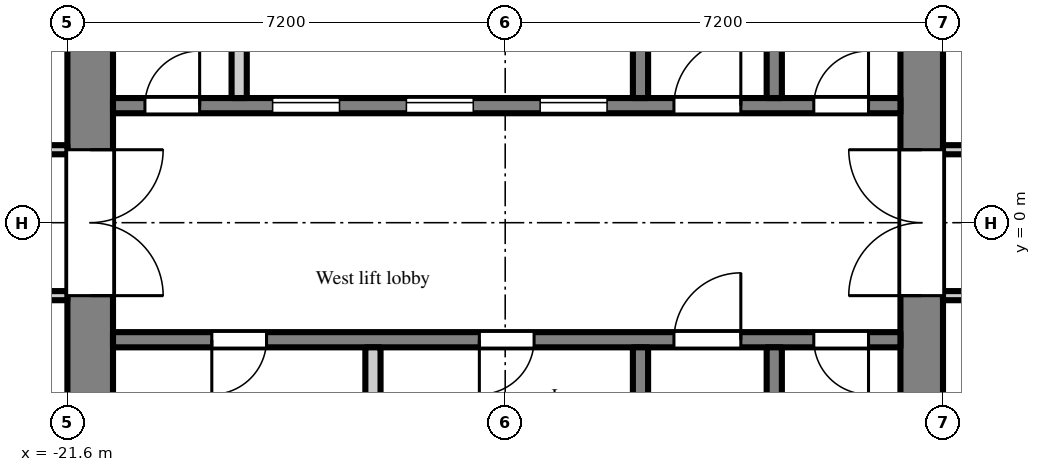
"""IFC4 building model, lengths in metres.
Left out: names, types, materials, properties, quantities, classifications, styles, units other than length and angle.
Written with IfcOpenShell. Run it as: python <this file> out.ifc"""

import sys

from ifc_helpers import new_model, si_unit, direction, frame, frame_2d, origin, place, context, subcontext, project, spatial, rectangle, extrude, element, fill, save


model = new_model("IFC4")
c1 = context("Model", 3, precision=1e-05, world=origin(), true_north=direction((0.0, 1.0)))
c2 = subcontext(c1, "Body", "Model", "MODEL_VIEW")
j1 = project(units=[si_unit("LENGTHUNIT", "METRE"), si_unit("PLANEANGLEUNIT", "RADIAN")], contexts=[c1])
p1 = place(None, origin())
s1 = spatial("IfcSite", under=j1, at=p1, CompositionType="ELEMENT")
p2 = place(p1, origin())
s2 = spatial("IfcBuilding", under=s1, at=p2, CompositionType="ELEMENT")
p3 = place(p2, frame((0.0, 0.0, 170.7)))
s3 = spatial("IfcBuildingStorey", under=s2, at=p3, CompositionType="ELEMENT", Elevation=170.7)
p4 = place(p3, frame((-7.55, -7.2, 0.0), z_axis=(0.0, 0.0, 1.0), x_axis=(0.0, 1.0, 0.0)))
e1 = element("IfcWall", 1, at=p4, inside=s3, PredefinedType="SHEAR", context=c2, shape_type="SweptSolid", body=[
    extrude(rectangle(XDim=14.4, YDim=0.7, at=frame_2d((7.2, 0.0))), origin(), (0.0, 0.0, 1.0), 2.6),
])
p5 = place(p4, frame((6.0, 0.0, 0.0)))
e2 = element("IfcOpeningElement", 2, at=p5, cuts=e1, PredefinedType="OPENING", context=c2, shape_type="SweptSolid", body=[
    extrude(rectangle(XDim=2.4, YDim=2.2, at=frame_2d((1.2, 1.1))), frame((0.0, 0.36, 0.0), z_axis=(0.0, -1.0, 0.0), x_axis=(1.0, 0.0, 0.0)), (0.0, 0.0, 1.0), 0.72),
])
p6 = place(p3, frame((-21.225, -7.2, 0.0), z_axis=(0.0, 0.0, 1.0), x_axis=(0.0, 1.0, 0.0)))
e3 = element("IfcWall", 3, at=p6, inside=s3, PredefinedType="SHEAR", context=c2, shape_type="SweptSolid", body=[
    extrude(rectangle(XDim=14.4, YDim=0.75, at=frame_2d((7.2, 0.0))), origin(), (0.0, 0.0, 1.0), 2.6),
])
p7 = place(p6, frame((6.0, 0.0, 0.0)))
e4 = element("IfcOpeningElement", 4, at=p7, cuts=e3, PredefinedType="OPENING", context=c2, shape_type="SweptSolid", body=[
    extrude(rectangle(XDim=2.4, YDim=2.2, at=frame_2d((1.2, 1.1))), frame((0.0, 0.385, 0.0), z_axis=(0.0, -1.0, 0.0), x_axis=(1.0, 0.0, 0.0)), (0.0, 0.0, 1.0), 0.77),
])
p8 = place(p3, frame((-7.9, 1.925, 0.0), z_axis=(0.0, 0.0, 1.0), x_axis=(-1.0, 0.0, 0.0)))
e5 = element("IfcWall", 5, at=p8, inside=s3, PredefinedType="SHEAR", context=c2, shape_type="SweptSolid", body=[
    extrude(rectangle(XDim=12.95, YDim=0.25, at=frame_2d((6.475, 0.0))), origin(), (0.0, 0.0, 1.0), 2.6),
])
p9 = place(p8, frame((4.825, 0.0, 0.0)))
e6 = element("IfcOpeningElement", 6, at=p9, cuts=e5, PredefinedType="OPENING", context=c2, shape_type="SweptSolid", body=[
    extrude(rectangle(XDim=1.1, YDim=2.1, at=frame_2d((0.55, 1.05))), frame((0.0, 0.135, 0.0), z_axis=(0.0, -1.0, 0.0), x_axis=(1.0, 0.0, 0.0)), (0.0, 0.0, 1.0), 0.27),
])
p10 = place(p8, frame((7.025, 0.0, 0.0)))
e7 = element("IfcOpeningElement", 7, at=p10, cuts=e5, PredefinedType="OPENING", context=c2, shape_type="SweptSolid", body=[
    extrude(rectangle(XDim=1.1, YDim=2.1, at=frame_2d((0.55, 1.05))), frame((0.0, 0.135, 0.0), z_axis=(0.0, -1.0, 0.0), x_axis=(1.0, 0.0, 0.0)), (0.0, 0.0, 1.0), 0.27),
])
p11 = place(p8, frame((9.225, 0.0, 0.0)))
e8 = element("IfcOpeningElement", 8, at=p11, cuts=e5, PredefinedType="OPENING", context=c2, shape_type="SweptSolid", body=[
    extrude(rectangle(XDim=1.1, YDim=2.1, at=frame_2d((0.55, 1.05))), frame((0.0, 0.135, 0.0), z_axis=(0.0, -1.0, 0.0), x_axis=(1.0, 0.0, 0.0)), (0.0, 0.0, 1.0), 0.27),
])
p12 = place(p8, frame((0.525, 0.0, 0.0)))
e9 = element("IfcOpeningElement", 9, at=p12, cuts=e5, PredefinedType="OPENING", context=c2, shape_type="SweptSolid", body=[
    extrude(rectangle(XDim=0.9, YDim=2.1, at=frame_2d((0.45, 1.05))), frame((0.0, 0.135, 0.0), z_axis=(0.0, -1.0, 0.0), x_axis=(1.0, 0.0, 0.0)), (0.0, 0.0, 1.0), 0.27),
])
p13 = place(p8, frame((2.625, 0.0, 0.0)))
e10 = element("IfcOpeningElement", 10, at=p13, cuts=e5, PredefinedType="OPENING", context=c2, shape_type="SweptSolid", body=[
    extrude(rectangle(XDim=1.1, YDim=2.1, at=frame_2d((0.55, 1.05))), frame((0.0, 0.135, 0.0), z_axis=(0.0, -1.0, 0.0), x_axis=(1.0, 0.0, 0.0)), (0.0, 0.0, 1.0), 0.27),
])
p14 = place(p8, frame((11.525, 0.0, 0.0)))
e11 = element("IfcOpeningElement", 11, at=p14, cuts=e5, PredefinedType="OPENING", context=c2, shape_type="SweptSolid", body=[
    extrude(rectangle(XDim=0.9, YDim=2.1, at=frame_2d((0.45, 1.05))), frame((0.0, 0.135, 0.0), z_axis=(0.0, -1.0, 0.0), x_axis=(1.0, 0.0, 0.0)), (0.0, 0.0, 1.0), 0.27),
])
p15 = place(p3, frame((-9.975, 2.05, 0.0), z_axis=(0.0, 0.0, 1.0), x_axis=(0.0, 1.0, 0.0)))
e12 = element("IfcWall", 12, at=p15, inside=s3, PredefinedType="SHEAR", context=c2, shape_type="SweptSolid", body=[
    extrude(rectangle(XDim=4.75, YDim=0.25, at=frame_2d((2.375, 0.0))), origin(), (0.0, 0.0, 1.0), 2.6),
])
p16 = place(p15, frame((2.95, 0.0, 0.0)))
e13 = element("IfcOpeningElement", 13, at=p16, cuts=e12, PredefinedType="OPENING", context=c2, shape_type="SweptSolid", body=[
    extrude(rectangle(XDim=1.1, YDim=2.1, at=frame_2d((0.55, 1.05))), frame((0.0, 0.135, 0.0), z_axis=(0.0, -1.0, 0.0), x_axis=(1.0, 0.0, 0.0)), (0.0, 0.0, 1.0), 0.27),
])
p17 = place(p3, frame((-12.175, 2.05, 0.0), z_axis=(0.0, 0.0, 1.0), x_axis=(0.0, 1.0, 0.0)))
e14 = element("IfcWall", 14, at=p17, inside=s3, PredefinedType="SHEAR", context=c2, shape_type="SweptSolid", body=[
    extrude(rectangle(XDim=4.75, YDim=0.25, at=frame_2d((2.375, 0.0))), origin(), (0.0, 0.0, 1.0), 2.6),
])
p18 = place(p17, frame((3.0, 0.0, 0.0)))
e15 = element("IfcOpeningElement", 15, at=p18, cuts=e14, PredefinedType="OPENING", context=c2, shape_type="SweptSolid", body=[
    extrude(rectangle(XDim=1.1, YDim=2.1, at=frame_2d((0.55, 1.05))), frame((0.0, 0.135, 0.0), z_axis=(0.0, -1.0, 0.0), x_axis=(1.0, 0.0, 0.0)), (0.0, 0.0, 1.0), 0.27),
])
p19 = place(p3, frame((-18.775, 2.05, 0.0), z_axis=(0.0, 0.0, 1.0), x_axis=(0.0, 1.0, 0.0)))
e16 = element("IfcWall", 16, at=p19, inside=s3, PredefinedType="PARTITIONING", context=c2, shape_type="SweptSolid", body=[
    extrude(rectangle(XDim=2.1, YDim=0.25, at=frame_2d((1.05, 0.0))), origin(), (0.0, 0.0, 1.0), 2.6),
])
p20 = place(p3, frame((-7.9, -1.925, 0.0), z_axis=(0.0, 0.0, 1.0), x_axis=(-1.0, 0.0, 0.0)))
e17 = element("IfcWall", 17, at=p20, inside=s3, PredefinedType="SHEAR", context=c2, shape_type="SweptSolid", body=[
    extrude(rectangle(XDim=12.95, YDim=0.25, at=frame_2d((6.475, 0.0))), origin(), (0.0, 0.0, 1.0), 2.6),
])
p21 = place(p20, frame((0.525, 0.0, 0.0)))
e18 = element("IfcOpeningElement", 18, at=p21, cuts=e17, PredefinedType="OPENING", context=c2, shape_type="SweptSolid", body=[
    extrude(rectangle(XDim=0.9, YDim=2.1, at=frame_2d((0.45, 1.05))), frame((0.0, 0.135, 0.0), z_axis=(0.0, -1.0, 0.0), x_axis=(1.0, 0.0, 0.0)), (0.0, 0.0, 1.0), 0.27),
])
p22 = place(p20, frame((2.625, 0.0, 0.0)))
e19 = element("IfcOpeningElement", 19, at=p22, cuts=e17, PredefinedType="OPENING", context=c2, shape_type="SweptSolid", body=[
    extrude(rectangle(XDim=1.1, YDim=2.1, at=frame_2d((0.55, 1.05))), frame((0.0, 0.135, 0.0), z_axis=(0.0, -1.0, 0.0), x_axis=(1.0, 0.0, 0.0)), (0.0, 0.0, 1.0), 0.27),
])
p23 = place(p20, frame((6.025, 0.0, 0.0)))
e20 = element("IfcOpeningElement", 20, at=p23, cuts=e17, PredefinedType="OPENING", context=c2, shape_type="SweptSolid", body=[
    extrude(rectangle(XDim=0.9, YDim=2.1, at=frame_2d((0.45, 1.05))), frame((0.0, 0.135, 0.0), z_axis=(0.0, -1.0, 0.0), x_axis=(1.0, 0.0, 0.0)), (0.0, 0.0, 1.0), 0.27),
])
p24 = place(p20, frame((10.425, 0.0, 0.0)))
e21 = element("IfcOpeningElement", 21, at=p24, cuts=e17, PredefinedType="OPENING", context=c2, shape_type="SweptSolid", body=[
    extrude(rectangle(XDim=0.9, YDim=2.1, at=frame_2d((0.45, 1.05))), frame((0.0, 0.135, 0.0), z_axis=(0.0, -1.0, 0.0), x_axis=(1.0, 0.0, 0.0)), (0.0, 0.0, 1.0), 0.27),
])
p25 = place(p3, frame((-9.975, -2.05, 0.0), z_axis=(0.0, 0.0, 1.0), x_axis=(0.0, -1.0, 0.0)))
e22 = element("IfcWall", 22, at=p25, inside=s3, PredefinedType="SHEAR", context=c2, shape_type="SweptSolid", body=[
    extrude(rectangle(XDim=4.75, YDim=0.25, at=frame_2d((2.375, 0.0))), origin(), (0.0, 0.0, 1.0), 2.6),
])
p26 = place(p25, frame((2.95, 0.0, 0.0)))
e23 = element("IfcOpeningElement", 23, at=p26, cuts=e22, PredefinedType="OPENING", context=c2, shape_type="SweptSolid", body=[
    extrude(rectangle(XDim=1.1, YDim=2.1, at=frame_2d((0.55, 1.05))), frame((0.0, 0.135, 0.0), z_axis=(0.0, -1.0, 0.0), x_axis=(1.0, 0.0, 0.0)), (0.0, 0.0, 1.0), 0.27),
])
p27 = place(p3, frame((-12.175, -2.05, 0.0), z_axis=(0.0, 0.0, 1.0), x_axis=(0.0, -1.0, 0.0)))
e24 = element("IfcWall", 24, at=p27, inside=s3, PredefinedType="SHEAR", context=c2, shape_type="SweptSolid", body=[
    extrude(rectangle(XDim=4.75, YDim=0.25, at=frame_2d((2.375, 0.0))), origin(), (0.0, 0.0, 1.0), 2.6),
])
p28 = place(p27, frame((3.0, 0.0, 0.0)))
e25 = element("IfcOpeningElement", 25, at=p28, cuts=e24, PredefinedType="OPENING", context=c2, shape_type="SweptSolid", body=[
    extrude(rectangle(XDim=1.1, YDim=2.1, at=frame_2d((0.55, 1.05))), frame((0.0, 0.135, 0.0), z_axis=(0.0, -1.0, 0.0), x_axis=(1.0, 0.0, 0.0)), (0.0, 0.0, 1.0), 0.27),
])
p29 = place(p3, frame((-16.575, -2.05, 0.0), z_axis=(0.0, 0.0, 1.0), x_axis=(0.0, -1.0, 0.0)))
e26 = element("IfcWall", 26, at=p29, inside=s3, PredefinedType="PARTITIONING", context=c2, shape_type="SweptSolid", body=[
    extrude(rectangle(XDim=2.1, YDim=0.25, at=frame_2d((1.05, 0.0))), origin(), (0.0, 0.0, 1.0), 2.6),
])
p30 = place(p3, frame((-36.5, -1.2, 0.0), z_axis=(0.0, 0.0, 1.0), x_axis=(1.0, 0.0, 0.0)))
e27 = element("IfcWall", 27, at=p30, inside=s3, PredefinedType="PARTITIONING", context=c2, shape_type="SweptSolid", body=[
    extrude(rectangle(XDim=14.9, YDim=0.15, at=frame_2d((7.45, 0.0))), origin(), (0.0, 0.0, 1.0), 2.6),
])
p31 = place(p30, frame((10.4, 0.0, 0.0)))
e28 = element("IfcOpeningElement", 28, at=p31, cuts=e27, PredefinedType="OPENING", context=c2, shape_type="SweptSolid", body=[
    extrude(rectangle(XDim=1.8, YDim=2.1, at=frame_2d((0.9, 1.05))), frame((0.0, 0.085, 0.0), z_axis=(0.0, -1.0, 0.0), x_axis=(1.0, 0.0, 0.0)), (0.0, 0.0, 1.0), 0.17),
])
p32 = place(p30, frame((4.3, 0.0, 0.0)))
e29 = element("IfcOpeningElement", 29, at=p32, cuts=e27, PredefinedType="OPENING", context=c2, shape_type="SweptSolid", body=[
    extrude(rectangle(XDim=1.0, YDim=2.1, at=frame_2d((0.5, 1.05))), frame((0.0, 0.085, 0.0), z_axis=(0.0, -1.0, 0.0), x_axis=(1.0, 0.0, 0.0)), (0.0, 0.0, 1.0), 0.17),
])
p33 = place(p30, frame((1.15, 0.0, 0.0)))
e30 = element("IfcOpeningElement", 30, at=p33, cuts=e27, PredefinedType="OPENING", context=c2, shape_type="SweptSolid", body=[
    extrude(rectangle(XDim=1.8, YDim=2.1, at=frame_2d((0.9, 1.05))), frame((0.0, 0.085, 0.0), z_axis=(0.0, -1.0, 0.0), x_axis=(1.0, 0.0, 0.0)), (0.0, 0.0, 1.0), 0.17),
])
p34 = place(p3, frame((-36.5, 1.2, 0.0), z_axis=(0.0, 0.0, 1.0), x_axis=(1.0, 0.0, 0.0)))
e31 = element("IfcWall", 31, at=p34, inside=s3, PredefinedType="PARTITIONING", context=c2, shape_type="SweptSolid", body=[
    extrude(rectangle(XDim=14.9, YDim=0.15, at=frame_2d((7.45, 0.0))), origin(), (0.0, 0.0, 1.0), 2.6),
])
p35 = place(p34, frame((13.55, 0.0, 0.0)))
e32 = element("IfcOpeningElement", 32, at=p35, cuts=e31, PredefinedType="OPENING", context=c2, shape_type="SweptSolid", body=[
    extrude(rectangle(XDim=0.9, YDim=2.1, at=frame_2d((0.45, 1.05))), frame((0.0, 0.085, 0.0), z_axis=(0.0, -1.0, 0.0), x_axis=(1.0, 0.0, 0.0)), (0.0, 0.0, 1.0), 0.17),
])
p36 = place(p34, frame((11.75, 0.0, 0.0)))
e33 = element("IfcOpeningElement", 33, at=p36, cuts=e31, PredefinedType="OPENING", context=c2, shape_type="SweptSolid", body=[
    extrude(rectangle(XDim=0.9, YDim=2.1, at=frame_2d((0.45, 1.05))), frame((0.0, 0.085, 0.0), z_axis=(0.0, -1.0, 0.0), x_axis=(1.0, 0.0, 0.0)), (0.0, 0.0, 1.0), 0.17),
])
p37 = place(p34, frame((9.95, 0.0, 0.0)))
e34 = element("IfcOpeningElement", 34, at=p37, cuts=e31, PredefinedType="OPENING", context=c2, shape_type="SweptSolid", body=[
    extrude(rectangle(XDim=0.9, YDim=2.1, at=frame_2d((0.45, 1.05))), frame((0.0, 0.085, 0.0), z_axis=(0.0, -1.0, 0.0), x_axis=(1.0, 0.0, 0.0)), (0.0, 0.0, 1.0), 0.17),
])
p38 = place(p34, frame((8.15, 0.0, 0.0)))
e35 = element("IfcOpeningElement", 35, at=p38, cuts=e31, PredefinedType="OPENING", context=c2, shape_type="SweptSolid", body=[
    extrude(rectangle(XDim=0.9, YDim=2.1, at=frame_2d((0.45, 1.05))), frame((0.0, 0.085, 0.0), z_axis=(0.0, -1.0, 0.0), x_axis=(1.0, 0.0, 0.0)), (0.0, 0.0, 1.0), 0.17),
])
p39 = place(p34, frame((5.45, 0.0, 0.0)))
e36 = element("IfcOpeningElement", 36, at=p39, cuts=e31, PredefinedType="OPENING", context=c2, shape_type="SweptSolid", body=[
    extrude(rectangle(XDim=0.9, YDim=2.1, at=frame_2d((0.45, 1.05))), frame((0.0, 0.085, 0.0), z_axis=(0.0, -1.0, 0.0), x_axis=(1.0, 0.0, 0.0)), (0.0, 0.0, 1.0), 0.17),
])
p40 = place(p34, frame((1.15, 0.0, 0.0)))
e37 = element("IfcOpeningElement", 37, at=p40, cuts=e31, PredefinedType="OPENING", context=c2, shape_type="SweptSolid", body=[
    extrude(rectangle(XDim=1.8, YDim=2.1, at=frame_2d((0.9, 1.05))), frame((0.0, 0.085, 0.0), z_axis=(0.0, -1.0, 0.0), x_axis=(1.0, 0.0, 0.0)), (0.0, 0.0, 1.0), 0.17),
])
p41 = place(p3, frame((-7.2, -1.2, 0.0), z_axis=(0.0, 0.0, 1.0), x_axis=(1.0, 0.0, 0.0)))
e38 = element("IfcWall", 38, at=p41, inside=s3, PredefinedType="PARTITIONING", context=c2, shape_type="SweptSolid", body=[
    extrude(rectangle(XDim=6.075, YDim=0.15, at=frame_2d((3.038, 0.0))), origin(), (0.0, 0.0, 1.0), 2.6),
])
p42 = place(p41, frame((1.95, 0.0, 0.0)))
e39 = element("IfcOpeningElement", 39, at=p42, cuts=e38, PredefinedType="OPENING", context=c2, shape_type="SweptSolid", body=[
    extrude(rectangle(XDim=0.9, YDim=2.1, at=frame_2d((0.45, 1.05))), frame((0.0, 0.085, 0.0), z_axis=(0.0, -1.0, 0.0), x_axis=(1.0, 0.0, 0.0)), (0.0, 0.0, 1.0), 0.17),
])
p43 = place(p3, frame((-7.2, 1.2, 0.0), z_axis=(0.0, 0.0, 1.0), x_axis=(1.0, 0.0, 0.0)))
e40 = element("IfcWall", 40, at=p43, inside=s3, PredefinedType="PARTITIONING", context=c2, shape_type="SweptSolid", body=[
    extrude(rectangle(XDim=6.075, YDim=0.15, at=frame_2d((3.038, 0.0))), origin(), (0.0, 0.0, 1.0), 2.6),
])
p44 = place(p43, frame((1.55, 0.0, 0.0)))
e41 = element("IfcOpeningElement", 41, at=p44, cuts=e40, PredefinedType="OPENING", context=c2, shape_type="SweptSolid", body=[
    extrude(rectangle(XDim=0.9, YDim=2.1, at=frame_2d((0.45, 1.05))), frame((0.0, 0.085, 0.0), z_axis=(0.0, -1.0, 0.0), x_axis=(1.0, 0.0, 0.0)), (0.0, 0.0, 1.0), 0.17),
])
p45 = place(p9, origin())
e42 = element("IfcDoor", 42, at=p45, inside=s3, OperationType="SLIDING_TO_LEFT", PredefinedType="DOOR", context=c2, shape_type="SweptSolid", body=[
    extrude(rectangle(XDim=1.1, YDim=2.1, at=frame_2d((0.55, 1.05))), frame((0.0, 0.025, 0.0), z_axis=(0.0, -1.0, 0.0), x_axis=(1.0, 0.0, 0.0)), (0.0, 0.0, 1.0), 0.05),
])
fill(e6, e42)
p46 = place(p10, origin())
e43 = element("IfcDoor", 43, at=p46, inside=s3, OperationType="SLIDING_TO_LEFT", PredefinedType="DOOR", context=c2, shape_type="SweptSolid", body=[
    extrude(rectangle(XDim=1.1, YDim=2.1, at=frame_2d((0.55, 1.05))), frame((0.0, 0.025, 0.0), z_axis=(0.0, -1.0, 0.0), x_axis=(1.0, 0.0, 0.0)), (0.0, 0.0, 1.0), 0.05),
])
fill(e7, e43)
p47 = place(p11, origin())
e44 = element("IfcDoor", 44, at=p47, inside=s3, OperationType="SLIDING_TO_LEFT", PredefinedType="DOOR", context=c2, shape_type="SweptSolid", body=[
    extrude(rectangle(XDim=1.1, YDim=2.1, at=frame_2d((0.55, 1.05))), frame((0.0, 0.025, 0.0), z_axis=(0.0, -1.0, 0.0), x_axis=(1.0, 0.0, 0.0)), (0.0, 0.0, 1.0), 0.05),
])
fill(e8, e44)
p48 = place(p12, frame((0.9, 0.0, 0.0), z_axis=(0.0, 0.0, 1.0), x_axis=(-1.0, 0.0, 0.0)))
e45 = element("IfcDoor", 45, at=p48, inside=s3, OperationType="SINGLE_SWING_RIGHT", PredefinedType="DOOR", context=c2, shape_type="SweptSolid", body=[
    extrude(rectangle(XDim=0.9, YDim=2.1, at=frame_2d((0.45, 1.05))), frame((0.0, 0.025, 0.0), z_axis=(0.0, -1.0, 0.0), x_axis=(1.0, 0.0, 0.0)), (0.0, 0.0, 1.0), 0.05),
])
fill(e9, e45)
p49 = place(p21, origin())
e46 = element("IfcDoor", 46, at=p49, inside=s3, OperationType="SINGLE_SWING_LEFT", PredefinedType="DOOR", context=c2, shape_type="SweptSolid", body=[
    extrude(rectangle(XDim=0.9, YDim=2.1, at=frame_2d((0.45, 1.05))), frame((0.0, 0.025, 0.0), z_axis=(0.0, -1.0, 0.0), x_axis=(1.0, 0.0, 0.0)), (0.0, 0.0, 1.0), 0.05),
])
fill(e18, e46)
p50 = place(p13, frame((1.1, 0.0, 0.0), z_axis=(0.0, 0.0, 1.0), x_axis=(-1.0, 0.0, 0.0)))
e47 = element("IfcDoor", 47, at=p50, inside=s3, OperationType="SINGLE_SWING_RIGHT", PredefinedType="DOOR", context=c2, shape_type="SweptSolid", body=[
    extrude(rectangle(XDim=1.1, YDim=2.1, at=frame_2d((0.55, 1.05))), frame((0.0, 0.025, 0.0), z_axis=(0.0, -1.0, 0.0), x_axis=(1.0, 0.0, 0.0)), (0.0, 0.0, 1.0), 0.05),
])
fill(e10, e47)
p51 = place(p22, frame((1.1, 0.0, 0.0), z_axis=(0.0, 0.0, 1.0), x_axis=(-1.0, 0.0, 0.0)))
e48 = element("IfcDoor", 48, at=p51, inside=s3, OperationType="SINGLE_SWING_RIGHT", PredefinedType="DOOR", context=c2, shape_type="SweptSolid", body=[
    extrude(rectangle(XDim=1.1, YDim=2.1, at=frame_2d((0.55, 1.05))), frame((0.0, 0.025, 0.0), z_axis=(0.0, -1.0, 0.0), x_axis=(1.0, 0.0, 0.0)), (0.0, 0.0, 1.0), 0.05),
])
fill(e19, e48)
p52 = place(p5, origin())
e49 = element("IfcDoor", 49, at=p52, inside=s3, OperationType="DOUBLE_DOOR_DOUBLE_SWING", PredefinedType="DOOR", context=c2, shape_type="SweptSolid", body=[
    extrude(rectangle(XDim=2.4, YDim=2.2, at=frame_2d((1.2, 1.1))), frame((0.0, 0.025, 0.0), z_axis=(0.0, -1.0, 0.0), x_axis=(1.0, 0.0, 0.0)), (0.0, 0.0, 1.0), 0.05),
])
fill(e2, e49)
p53 = place(p7, frame((2.4, 0.0, 0.0), z_axis=(0.0, 0.0, 1.0), x_axis=(-1.0, 0.0, 0.0)))
e50 = element("IfcDoor", 50, at=p53, inside=s3, OperationType="DOUBLE_DOOR_DOUBLE_SWING", PredefinedType="DOOR", context=c2, shape_type="SweptSolid", body=[
    extrude(rectangle(XDim=2.4, YDim=2.2, at=frame_2d((1.2, 1.1))), frame((0.0, 0.025, 0.0), z_axis=(0.0, -1.0, 0.0), x_axis=(1.0, 0.0, 0.0)), (0.0, 0.0, 1.0), 0.05),
])
fill(e4, e50)
p54 = place(p14, frame((0.9, 0.0, 0.0), z_axis=(0.0, 0.0, 1.0), x_axis=(-1.0, 0.0, 0.0)))
e51 = element("IfcDoor", 51, at=p54, inside=s3, OperationType="SINGLE_SWING_RIGHT", PredefinedType="DOOR", context=c2, shape_type="SweptSolid", body=[
    extrude(rectangle(XDim=0.9, YDim=2.1, at=frame_2d((0.45, 1.05))), frame((0.0, 0.025, 0.0), z_axis=(0.0, -1.0, 0.0), x_axis=(1.0, 0.0, 0.0)), (0.0, 0.0, 1.0), 0.05),
])
fill(e11, e51)
p55 = place(p23, origin())
e52 = element("IfcDoor", 52, at=p55, inside=s3, OperationType="SINGLE_SWING_RIGHT", PredefinedType="DOOR", context=c2, shape_type="SweptSolid", body=[
    extrude(rectangle(XDim=0.9, YDim=2.1, at=frame_2d((0.45, 1.05))), frame((0.0, 0.025, 0.0), z_axis=(0.0, -1.0, 0.0), x_axis=(1.0, 0.0, 0.0)), (0.0, 0.0, 1.0), 0.05),
])
fill(e20, e52)
p56 = place(p24, origin())
e53 = element("IfcDoor", 53, at=p56, inside=s3, OperationType="SINGLE_SWING_RIGHT", PredefinedType="DOOR", context=c2, shape_type="SweptSolid", body=[
    extrude(rectangle(XDim=0.9, YDim=2.1, at=frame_2d((0.45, 1.05))), frame((0.0, 0.025, 0.0), z_axis=(0.0, -1.0, 0.0), x_axis=(1.0, 0.0, 0.0)), (0.0, 0.0, 1.0), 0.05),
])
fill(e21, e53)
save(model, sys.argv[1])
